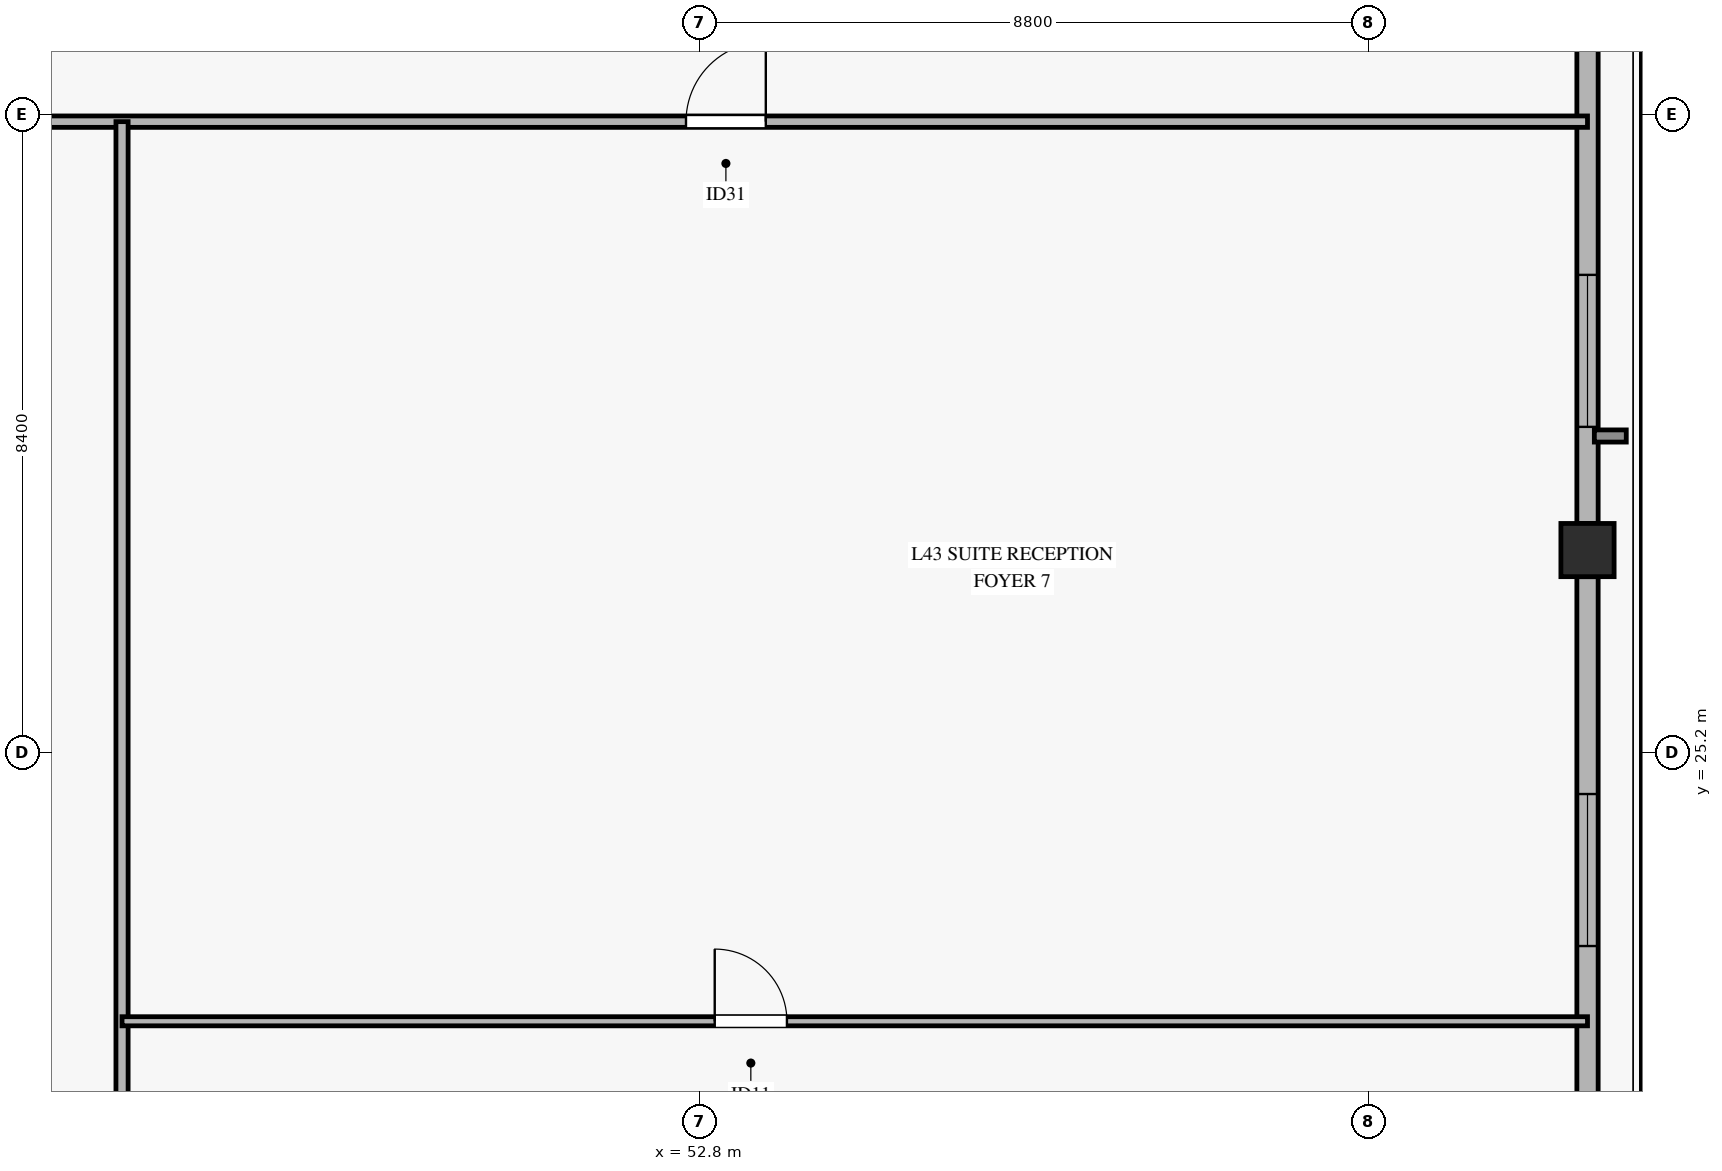
"""IFC4 building model, lengths in metres.
Left out: names, types, materials, properties, quantities, classifications, styles, units other than length and angle.
Written with IfcOpenShell. Run it as: python <this file> out.ifc"""

import sys

from ifc_helpers import new_model, si_unit, direction, frame, frame_2d, origin, origin_2d, place, context, subcontext, project, spatial, rectangle, hollow_rectangle, extrude, source, transform, mapped, element, fill, save


model = new_model("IFC4")
c1 = context("Model", 3, precision=1e-05, world=origin(), true_north=direction((0.0, 1.0)))
c2 = subcontext(c1, "Body", "Model", "MODEL_VIEW")
j1 = project(units=[si_unit("LENGTHUNIT", "METRE"), si_unit("PLANEANGLEUNIT", "RADIAN")], contexts=[c1])
p1 = place(None, origin())
s1 = spatial("IfcSite", under=j1, at=p1, CompositionType="ELEMENT")
p2 = place(p1, origin())
s2 = spatial("IfcBuilding", under=s1, at=p2, CompositionType="ELEMENT")
p3 = place(p2, frame((0.0, 0.0, 173.7)))
s3 = spatial("IfcBuildingStorey", under=s2, at=p3, CompositionType="ELEMENT", Elevation=173.7)
m1 = source(origin(), c2, "Body", "SweptSolid", [
    extrude(hollow_rectangle(XDim=0.7, YDim=0.7, WallThickness=0.032, at=origin_2d()), origin(), (0.0, 0.0, 1.0), 3.27),
])
p4 = place(p3, frame((64.481, 27.863, 0.0), z_axis=(0.0, 0.0, 1.0), x_axis=(1.0, 0.0, 0.0)))
e1 = element("IfcColumn", 1, at=p4, inside=s3, PredefinedType="COLUMN", context=c2, shape_type="MappedRepresentation", body=[
    mapped(m1, transform((0.0, 0.0, 0.0), x_axis=(1.0, 0.0, 0.0), y_axis=(0.0, 1.0, 0.0), z_axis=(0.0, 0.0, 1.0), scale=1.0)),
])
p5 = place(p3, frame((64.481, 12.513, 0.0), z_axis=(0.0, 0.0, 1.0), x_axis=(0.0, 1.0, 0.0)))
e2 = element("IfcWall", 2, at=p5, inside=s3, PredefinedType="SOLIDWALL", context=c2, shape_type="SweptSolid", body=[
    extrude(rectangle(XDim=15.0, YDim=0.28, at=frame_2d((7.5, 0.0))), origin(), (0.0, 0.0, 1.0), 2.75),
])
p6 = place(p5, frame((3.14, 0.0, 0.45)))
e3 = element("IfcOpeningElement", 3, at=p6, cuts=e2, PredefinedType="OPENING", context=c2, shape_type="SweptSolid", body=[
    extrude(rectangle(XDim=2.0, YDim=2.0, at=frame_2d((1.0, 1.0))), frame((0.0, 0.15, 0.0), z_axis=(0.0, -1.0, 0.0), x_axis=(1.0, 0.0, 0.0)), (0.0, 0.0, 1.0), 0.3),
])
p7 = place(p5, frame((10.14, 0.0, 0.45)))
e4 = element("IfcOpeningElement", 4, at=p7, cuts=e2, PredefinedType="OPENING", context=c2, shape_type="SweptSolid", body=[
    extrude(rectangle(XDim=2.0, YDim=2.0, at=frame_2d((1.0, 1.0))), frame((0.0, 0.15, 0.0), z_axis=(0.0, -1.0, 0.0), x_axis=(1.0, 0.0, 0.0)), (0.0, 0.0, 1.0), 0.3),
])
p8 = place(p3, frame((64.481, 28.213, 0.0), z_axis=(0.0, 0.0, 1.0), x_axis=(0.0, 1.0, 0.0)))
e5 = element("IfcWall", 5, at=p8, inside=s3, PredefinedType="SOLIDWALL", context=c2, shape_type="SweptSolid", body=[
    extrude(rectangle(XDim=15.0, YDim=0.28, at=frame_2d((7.5, 0.0))), origin(), (0.0, 0.0, 1.0), 2.75),
])
p9 = place(p8, frame((1.271, 0.0, 0.45)))
e6 = element("IfcOpeningElement", 6, at=p9, cuts=e5, PredefinedType="OPENING", context=c2, shape_type="SweptSolid", body=[
    extrude(rectangle(XDim=2.0, YDim=2.0, at=frame_2d((1.0, 1.0))), frame((0.0, 0.15, 0.0), z_axis=(0.0, -1.0, 0.0), x_axis=(1.0, 0.0, 0.0)), (0.0, 0.0, 1.0), 0.3),
])
p10 = place(p8, frame((11.685, 0.0, 0.45)))
e7 = element("IfcOpeningElement", 7, at=p10, cuts=e5, PredefinedType="OPENING", context=c2, shape_type="SweptSolid", body=[
    extrude(rectangle(XDim=2.0, YDim=2.0, at=frame_2d((1.0, 1.0))), frame((0.0, 0.15, 0.0), z_axis=(0.0, -1.0, 0.0), x_axis=(1.0, 0.0, 0.0)), (0.0, 0.0, 1.0), 0.3),
])
p11 = place(p3, frame((5.919, 33.5, 0.0), z_axis=(0.0, 0.0, 1.0), x_axis=(1.0, 0.0, 0.0)))
e8 = element("IfcWall", 8, at=p11, inside=s3, PredefinedType="PARTITIONING", context=c2, shape_type="SweptSolid", body=[
    extrude(rectangle(XDim=58.562, YDim=0.15, at=frame_2d((29.281, 0.0))), origin(), (0.0, 0.0, 1.0), 2.455),
])
p12 = place(p11, frame((6.214, 0.0, 0.0)))
e9 = element("IfcOpeningElement", 9, at=p12, cuts=e8, PredefinedType="OPENING", context=c2, shape_type="SweptSolid", body=[
    extrude(rectangle(XDim=1.05, YDim=2.15, at=frame_2d((0.525, 1.075))), frame((0.0, 0.085, 0.0), z_axis=(0.0, -1.0, 0.0), x_axis=(1.0, 0.0, 0.0)), (0.0, 0.0, 1.0), 0.17),
])
p13 = place(p11, frame((17.992, 0.0, 0.0)))
e10 = element("IfcOpeningElement", 10, at=p13, cuts=e8, PredefinedType="OPENING", context=c2, shape_type="SweptSolid", body=[
    extrude(rectangle(XDim=1.05, YDim=2.15, at=frame_2d((0.525, 1.075))), frame((0.0, 0.085, 0.0), z_axis=(0.0, -1.0, 0.0), x_axis=(1.0, 0.0, 0.0)), (0.0, 0.0, 1.0), 0.17),
])
p14 = place(p11, frame((23.322, 0.0, 0.0)))
e11 = element("IfcOpeningElement", 11, at=p14, cuts=e8, PredefinedType="OPENING", context=c2, shape_type="SweptSolid", body=[
    extrude(rectangle(XDim=1.05, YDim=2.15, at=frame_2d((0.525, 1.075))), frame((0.0, 0.085, 0.0), z_axis=(0.0, -1.0, 0.0), x_axis=(1.0, 0.0, 0.0)), (0.0, 0.0, 1.0), 0.17),
])
p15 = place(p11, frame((27.997, 0.0, 0.0)))
e12 = element("IfcOpeningElement", 12, at=p15, cuts=e8, PredefinedType="OPENING", context=c2, shape_type="SweptSolid", body=[
    extrude(rectangle(XDim=1.05, YDim=2.15, at=frame_2d((0.525, 1.075))), frame((0.0, 0.085, 0.0), z_axis=(0.0, -1.0, 0.0), x_axis=(1.0, 0.0, 0.0)), (0.0, 0.0, 1.0), 0.17),
])
p16 = place(p11, frame((32.397, 0.0, 0.0)))
e13 = element("IfcOpeningElement", 13, at=p16, cuts=e8, PredefinedType="OPENING", context=c2, shape_type="SweptSolid", body=[
    extrude(rectangle(XDim=1.05, YDim=2.15, at=frame_2d((0.525, 1.075))), frame((0.0, 0.085, 0.0), z_axis=(0.0, -1.0, 0.0), x_axis=(1.0, 0.0, 0.0)), (0.0, 0.0, 1.0), 0.17),
])
p17 = place(p11, frame((36.877, 0.0, 0.0)))
e14 = element("IfcOpeningElement", 14, at=p17, cuts=e8, PredefinedType="OPENING", context=c2, shape_type="SweptSolid", body=[
    extrude(rectangle(XDim=1.05, YDim=2.15, at=frame_2d((0.525, 1.075))), frame((0.0, 0.085, 0.0), z_axis=(0.0, -1.0, 0.0), x_axis=(1.0, 0.0, 0.0)), (0.0, 0.0, 1.0), 0.17),
])
p18 = place(p11, frame((46.701, 0.0, 0.0)))
e15 = element("IfcOpeningElement", 15, at=p18, cuts=e8, PredefinedType="OPENING", context=c2, shape_type="SweptSolid", body=[
    extrude(rectangle(XDim=1.05, YDim=2.15, at=frame_2d((0.525, 1.075))), frame((0.0, 0.085, 0.0), z_axis=(0.0, -1.0, 0.0), x_axis=(1.0, 0.0, 0.0)), (0.0, 0.0, 1.0), 0.17),
])
p19 = place(p3, frame((45.2, 9.626, 0.0), z_axis=(0.0, 0.0, 1.0), x_axis=(0.0, 1.0, 0.0)))
e16 = element("IfcWall", 16, at=p19, inside=s3, PredefinedType="PARTITIONING", context=c2, shape_type="SweptSolid", body=[
    extrude(rectangle(XDim=23.874, YDim=0.16, at=frame_2d((11.937, 0.0))), origin(), (0.0, 0.0, 1.0), 2.755),
])
p20 = place(p3, frame((45.2, 21.663, 0.0), z_axis=(0.0, 0.0, 1.0), x_axis=(1.0, 0.0, 0.0)))
e17 = element("IfcWall", 17, at=p20, inside=s3, PredefinedType="PARTITIONING", context=c2, shape_type="SweptSolid", body=[
    extrude(rectangle(XDim=19.281, YDim=0.12, at=frame_2d((9.641, 0.0))), origin(), (0.0, 0.0, 1.0), 2.455),
])
p21 = place(p20, frame((7.798, 0.0, 0.0)))
e18 = element("IfcOpeningElement", 18, at=p21, cuts=e17, PredefinedType="OPENING", context=c2, shape_type="SweptSolid", body=[
    extrude(rectangle(XDim=0.95, YDim=2.1, at=frame_2d((0.475, 1.05))), frame((0.0, 0.07, 0.0), z_axis=(0.0, -1.0, 0.0), x_axis=(1.0, 0.0, 0.0)), (0.0, 0.0, 1.0), 0.14),
])
m2 = source(origin(), c2, "Body", "SweptSolid", [
    extrude(rectangle(XDim=2.0, YDim=2.0, at=frame_2d((1.0, 1.0))), frame((0.0, 0.03, 0.0), z_axis=(0.0, -1.0, 0.0), x_axis=(1.0, 0.0, 0.0)), (0.0, 0.0, 1.0), 0.06),
])
p22 = place(p7, origin())
e19 = element("IfcWindow", 19, at=p22, inside=s3, PartitioningType="SINGLE_PANEL", PredefinedType="WINDOW", context=c2, shape_type="MappedRepresentation", body=[
    mapped(m2, transform((0.0, 0.0, 0.0), x_axis=(1.0, 0.0, 0.0), y_axis=(0.0, 1.0, 0.0), z_axis=(0.0, 0.0, 1.0), scale=1.0)),
])
fill(e4, e19)
p23 = place(p9, origin())
e20 = element("IfcWindow", 20, at=p23, inside=s3, PartitioningType="SINGLE_PANEL", PredefinedType="WINDOW", context=c2, shape_type="MappedRepresentation", body=[
    mapped(m2, transform((0.0, 0.0, 0.0), x_axis=(1.0, 0.0, 0.0), y_axis=(0.0, 1.0, 0.0), z_axis=(0.0, 0.0, 1.0), scale=1.0)),
])
fill(e6, e20)
m3 = source(origin(), c2, "Body", "SweptSolid", [
    extrude(rectangle(XDim=1.05, YDim=2.15, at=frame_2d((0.525, 1.075))), frame((0.0, 0.025, 0.0), z_axis=(0.0, -1.0, 0.0), x_axis=(1.0, 0.0, 0.0)), (0.0, 0.0, 1.0), 0.05),
])
p24 = place(p18, origin())
e21 = element("IfcDoor", 21, at=p24, inside=s3, OperationType="SINGLE_SWING_RIGHT", PredefinedType="DOOR", context=c2, shape_type="MappedRepresentation", body=[
    mapped(m3, transform((0.0, 0.0, 0.0), x_axis=(1.0, 0.0, 0.0), y_axis=(0.0, 1.0, 0.0), z_axis=(0.0, 0.0, 1.0), scale=1.0)),
])
fill(e15, e21)
m4 = source(origin(), c2, "Body", "SweptSolid", [
    extrude(rectangle(XDim=0.95, YDim=2.1, at=frame_2d((0.475, 1.05))), frame((0.0, 0.025, 0.0), z_axis=(0.0, -1.0, 0.0), x_axis=(1.0, 0.0, 0.0)), (0.0, 0.0, 1.0), 0.05),
])
p25 = place(p21, origin())
e22 = element("IfcDoor", 22, at=p25, inside=s3, OperationType="SINGLE_SWING_LEFT", PredefinedType="DOOR", context=c2, shape_type="MappedRepresentation", body=[
    mapped(m4, transform((0.0, 0.0, 0.0), x_axis=(1.0, 0.0, 0.0), y_axis=(0.0, 1.0, 0.0), z_axis=(0.0, 0.0, 1.0), scale=1.0)),
])
fill(e18, e22)
save(model, sys.argv[1])
